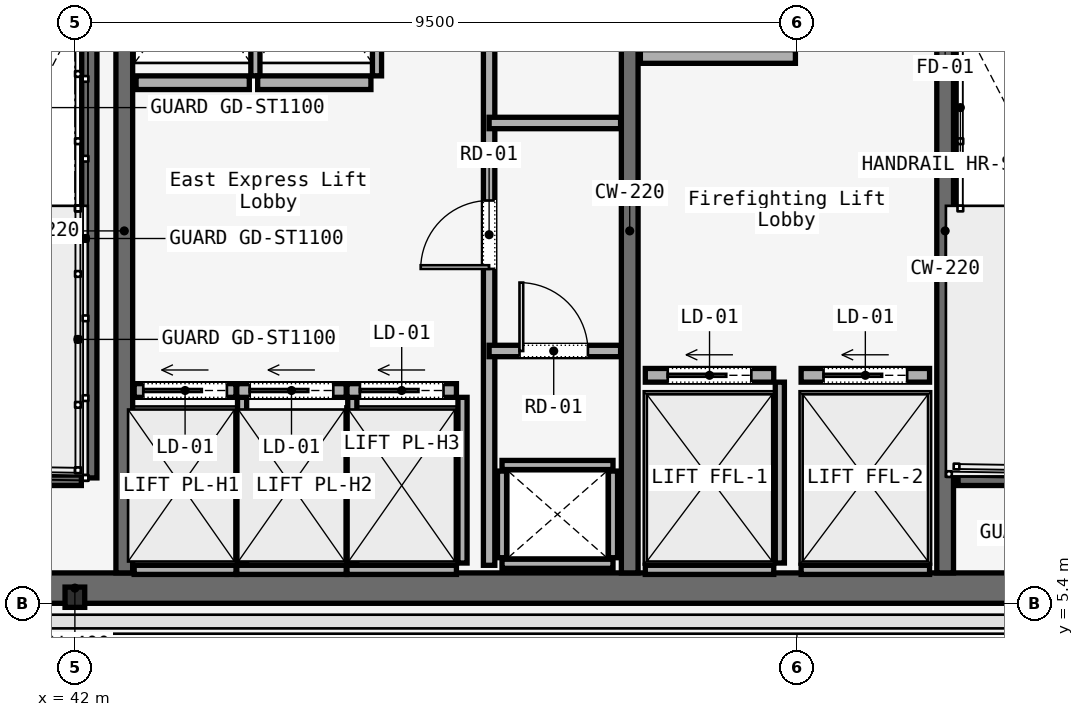
"""IFC4 building model, lengths in metres.
Left out: names, types, materials, properties, quantities, classifications, styles, units other than length and angle.
Written with IfcOpenShell. Run it as: python <this file> out.ifc"""

import sys

from ifc_helpers import new_model, si_unit, direction, frame, frame_2d, origin, origin_2d, place, context, subcontext, project, spatial, rectangle, i_section, extrude, element, fill, save


model = new_model("IFC4")
c1 = context("Model", 3, precision=1e-05, world=origin(), true_north=direction((0.0, 1.0)))
c2 = subcontext(c1, "Body", "Model", "MODEL_VIEW")
j1 = project(units=[si_unit("LENGTHUNIT", "METRE"), si_unit("PLANEANGLEUNIT", "RADIAN")], contexts=[c1])
p1 = place(None, origin())
s1 = spatial("IfcSite", under=j1, at=p1, CompositionType="ELEMENT")
p2 = place(p1, origin())
s2 = spatial("IfcBuilding", under=s1, at=p2, CompositionType="ELEMENT")
p3 = place(p2, frame((0.0, 0.0, 290.9)))
s3 = spatial("IfcBuildingStorey", under=s2, at=p3, CompositionType="ELEMENT", Elevation=290.9)
p4 = place(p3, frame((26.45, 5.6, 0.0), z_axis=(0.0, 0.0, 1.0), x_axis=(1.0, 0.0, 0.0)))
e1 = element("IfcWall", 1, at=p4, inside=s3, PredefinedType="SOLIDWALL", context=c2, shape_type="SweptSolid", body=[
    extrude(rectangle(XDim=31.1, YDim=0.4, at=frame_2d((15.55, 0.0))), origin(), (0.0, 0.0, 1.0), 3.58),
])
for number, where, z_axis, x_axis in (
    (2, (42.65, 5.8, 0.0), (0.0, 0.0, 1.0), (0.0, 1.0, 0.0)),
    (3, (49.3, 5.8, 0.0), (0.0, 0.0, 1.0), (0.0, 1.0, 0.0)),
):
    element("IfcWall", number, at=place(p3, frame(where, z_axis=z_axis, x_axis=x_axis)), inside=s3, PredefinedType="SOLIDWALL", context=c2, shape_type="SweptSolid", body=[
        extrude(rectangle(XDim=9.0, YDim=0.22, at=frame_2d((4.5, 0.0))), origin(), (0.0, 0.0, 1.0), 3.58),
    ])
p5 = place(p3, frame((53.45, 5.8, 0.0), z_axis=(0.0, 0.0, 1.0), x_axis=(0.0, 1.0, 0.0)))
e4 = element("IfcWall", 4, at=p5, inside=s3, PredefinedType="SOLIDWALL", context=c2, shape_type="SweptSolid", body=[
    extrude(rectangle(XDim=9.0, YDim=0.22, at=frame_2d((4.5, 0.0))), origin(), (0.0, 0.0, 1.0), 3.58),
])
p6 = place(p5, frame((7.5, 0.0, 0.0)))
e5 = element("IfcOpeningElement", 5, at=p6, cuts=e4, PredefinedType="OPENING", context=c2, shape_type="SweptSolid", body=[
    extrude(rectangle(XDim=1.1, YDim=2.2, at=frame_2d((0.55, 1.1))), frame((0.0, 0.11, 0.0), z_axis=(0.0, -1.0, 0.0), x_axis=(1.0, 0.0, 0.0)), (0.0, 0.0, 1.0), 0.22),
])
p7 = place(p3, frame((42.0, 5.48, 0.0), z_axis=(0.0, 0.0, 1.0), x_axis=(1.0, 0.0, 0.0)))
e6 = element("IfcColumn", 6, at=p7, inside=s3, PredefinedType="COLUMN", context=c2, shape_type="SweptSolid", body=[
    extrude(i_section(OverallWidth=0.259, OverallDepth=0.267, WebThickness=0.013, FlangeThickness=0.021, FilletRadius=0.013, at=origin_2d()), origin(), (0.0, 0.0, 1.0), 3.58),
])
p8 = place(p3, frame((42.19, 14.7, 0.0), z_axis=(0.0, 0.0, 1.0), x_axis=(0.0, -1.0, 0.0)))
e7 = element("IfcWall", 7, at=p8, inside=s3, PredefinedType="SOLIDWALL", context=c2, shape_type="SweptSolid", body=[
    extrude(rectangle(XDim=7.65, YDim=0.2, at=frame_2d((3.825, 0.0))), origin(), (0.0, 0.0, 1.0), 3.8),
])
for number, where, z_axis, x_axis in (
    (8, (38.97, 7.05, 0.0), (0.0, 0.0, 1.0), (1.0, 0.0, 0.0)),
    (9, (53.62, 7.05, 0.0), (0.0, 0.0, 1.0), (1.0, 0.0, 0.0)),
):
    element("IfcWall", number, at=place(p3, frame(where, z_axis=z_axis, x_axis=x_axis)), inside=s3, PredefinedType="SOLIDWALL", context=c2, shape_type="SweptSolid", body=[
        extrude(rectangle(XDim=3.115, YDim=0.2, at=frame_2d((1.558, 0.0))), origin(), (0.0, 0.0, 1.0), 3.8),
    ])
for number, where, z_axis, x_axis in (
    (10, (47.62, 5.92, 0.0), (0.0, 0.0, 1.0), (1.0, 0.0, 0.0)),
    (11, (47.62, 7.22, 0.0), (0.0, 0.0, 1.0), (1.0, 0.0, 0.0)),
):
    element("IfcWall", number, at=place(p3, frame(where, z_axis=z_axis, x_axis=x_axis)), inside=s3, PredefinedType="SOLIDWALL", context=c2, shape_type="SweptSolid", body=[
        extrude(rectangle(XDim=1.46, YDim=0.12, at=frame_2d((0.73, 0.0))), origin(), (0.0, 0.0, 1.0), 3.01),
    ])
for number, where, z_axis, x_axis in (
    (12, (47.62, 6.0, 0.0), (0.0, 0.0, 1.0), (0.0, 1.0, 0.0)),
    (13, (49.08, 6.0, 0.0), (0.0, 0.0, 1.0), (0.0, 1.0, 0.0)),
):
    element("IfcWall", number, at=place(p3, frame(where, z_axis=z_axis, x_axis=x_axis)), inside=s3, PredefinedType="SOLIDWALL", context=c2, shape_type="SweptSolid", body=[
        extrude(rectangle(XDim=1.14, YDim=0.12, at=frame_2d((0.57, 0.0))), origin(), (0.0, 0.0, 1.0), 3.01),
    ])
p9 = place(p3, frame((47.45, 5.9, 0.0), z_axis=(0.0, 0.0, 1.0), x_axis=(0.0, 1.0, 0.0)))
e14 = element("IfcWall", 14, at=p9, inside=s3, PredefinedType="PARTITIONING", context=c2, shape_type="SweptSolid", body=[
    extrude(rectangle(XDim=8.85, YDim=0.15, at=frame_2d((4.425, 0.0))), origin(), (0.0, 0.0, 1.0), 3.01),
])
p10 = place(p9, frame((3.9, 0.0, 0.0)))
e15 = element("IfcOpeningElement", 15, at=p10, cuts=e14, PredefinedType="OPENING", context=c2, shape_type="SweptSolid", body=[
    extrude(rectangle(XDim=0.9, YDim=2.1, at=frame_2d((0.45, 1.05))), frame((0.0, 0.075, 0.0), z_axis=(0.0, -1.0, 0.0), x_axis=(1.0, 0.0, 0.0)), (0.0, 0.0, 1.0), 0.15),
])
p11 = place(p3, frame((47.45, 8.72, 0.0), z_axis=(0.0, 0.0, 1.0), x_axis=(1.0, 0.0, 0.0)))
e16 = element("IfcWall", 16, at=p11, inside=s3, PredefinedType="PARTITIONING", context=c2, shape_type="SweptSolid", body=[
    extrude(rectangle(XDim=1.73, YDim=0.15, at=frame_2d((0.865, 0.0))), origin(), (0.0, 0.0, 1.0), 3.01),
])
p12 = place(p11, frame((0.4, 0.0, 0.0)))
e17 = element("IfcOpeningElement", 17, at=p12, cuts=e16, PredefinedType="OPENING", context=c2, shape_type="SweptSolid", body=[
    extrude(rectangle(XDim=0.9, YDim=2.1, at=frame_2d((0.45, 1.05))), frame((0.0, 0.075, 0.0), z_axis=(0.0, -1.0, 0.0), x_axis=(1.0, 0.0, 0.0)), (0.0, 0.0, 1.0), 0.15),
])
p13 = place(p3, frame((47.45, 11.72, 0.0), z_axis=(0.0, 0.0, 1.0), x_axis=(1.0, 0.0, 0.0)))
e18 = element("IfcWall", 18, at=p13, inside=s3, PredefinedType="PARTITIONING", context=c2, shape_type="SweptSolid", body=[
    extrude(rectangle(XDim=1.73, YDim=0.15, at=frame_2d((0.865, 0.0))), origin(), (0.0, 0.0, 1.0), 3.01),
])
p14 = place(p3, frame((42.78, 8.2, 0.0), z_axis=(0.0, 0.0, 1.0), x_axis=(1.0, 0.0, 0.0)))
e19 = element("IfcWall", 19, at=p14, inside=s3, PredefinedType="SOLIDWALL", context=c2, shape_type="SweptSolid", body=[
    extrude(rectangle(XDim=1.34, YDim=0.18, at=frame_2d((0.67, 0.0))), origin(), (0.0, 0.0, 1.0), 3.01),
])
p15 = place(p14, frame((0.12, 0.0, 0.0)))
e20 = element("IfcOpeningElement", 20, at=p15, cuts=e19, PredefinedType="OPENING", context=c2, shape_type="SweptSolid", body=[
    extrude(rectangle(XDim=1.1, YDim=2.2, at=frame_2d((0.55, 1.1))), frame((0.0, 0.09, 0.0), z_axis=(0.0, -1.0, 0.0), x_axis=(1.0, 0.0, 0.0)), (0.0, 0.0, 1.0), 0.18),
])
p16 = place(p3, frame((42.78, 5.84, 0.0), z_axis=(0.0, 0.0, 1.0), x_axis=(1.0, 0.0, 0.0)))
e21 = element("IfcWall", 21, at=p16, inside=s3, PredefinedType="SOLIDWALL", context=c2, shape_type="SweptSolid", body=[
    extrude(rectangle(XDim=1.34, YDim=0.12, at=frame_2d((0.67, 0.0))), origin(), (0.0, 0.0, 1.0), 3.01),
])
p17 = place(p3, frame((44.2, 5.93, 0.0), z_axis=(0.0, 0.0, 1.0), x_axis=(0.0, 1.0, 0.0)))
e22 = element("IfcWall", 22, at=p17, inside=s3, PredefinedType="SOLIDWALL", context=c2, shape_type="SweptSolid", body=[
    extrude(rectangle(XDim=2.18, YDim=0.12, at=frame_2d((1.09, 0.0))), origin(), (0.0, 0.0, 1.0), 3.01),
])
p18 = place(p3, frame((44.13, 8.2, 0.0), z_axis=(0.0, 0.0, 1.0), x_axis=(1.0, 0.0, 0.0)))
e23 = element("IfcWall", 23, at=p18, inside=s3, PredefinedType="SOLIDWALL", context=c2, shape_type="SweptSolid", body=[
    extrude(rectangle(XDim=1.44, YDim=0.18, at=frame_2d((0.72, 0.0))), origin(), (0.0, 0.0, 1.0), 3.01),
])
p19 = place(p18, frame((0.17, 0.0, 0.0)))
e24 = element("IfcOpeningElement", 24, at=p19, cuts=e23, PredefinedType="OPENING", context=c2, shape_type="SweptSolid", body=[
    extrude(rectangle(XDim=1.1, YDim=2.2, at=frame_2d((0.55, 1.1))), frame((0.0, 0.09, 0.0), z_axis=(0.0, -1.0, 0.0), x_axis=(1.0, 0.0, 0.0)), (0.0, 0.0, 1.0), 0.18),
])
p20 = place(p3, frame((44.13, 5.84, 0.0), z_axis=(0.0, 0.0, 1.0), x_axis=(1.0, 0.0, 0.0)))
e25 = element("IfcWall", 25, at=p20, inside=s3, PredefinedType="SOLIDWALL", context=c2, shape_type="SweptSolid", body=[
    extrude(rectangle(XDim=1.44, YDim=0.12, at=frame_2d((0.72, 0.0))), origin(), (0.0, 0.0, 1.0), 3.01),
])
p21 = place(p3, frame((45.65, 5.93, 0.0), z_axis=(0.0, 0.0, 1.0), x_axis=(0.0, 1.0, 0.0)))
e26 = element("IfcWall", 26, at=p21, inside=s3, PredefinedType="SOLIDWALL", context=c2, shape_type="SweptSolid", body=[
    extrude(rectangle(XDim=2.18, YDim=0.12, at=frame_2d((1.09, 0.0))), origin(), (0.0, 0.0, 1.0), 3.01),
])
p22 = place(p3, frame((45.58, 8.2, 0.0), z_axis=(0.0, 0.0, 1.0), x_axis=(1.0, 0.0, 0.0)))
e27 = element("IfcWall", 27, at=p22, inside=s3, PredefinedType="SOLIDWALL", context=c2, shape_type="SweptSolid", body=[
    extrude(rectangle(XDim=1.44, YDim=0.18, at=frame_2d((0.72, 0.0))), origin(), (0.0, 0.0, 1.0), 3.01),
])
p23 = place(p22, frame((0.17, 0.0, 0.0)))
e28 = element("IfcOpeningElement", 28, at=p23, cuts=e27, PredefinedType="OPENING", context=c2, shape_type="SweptSolid", body=[
    extrude(rectangle(XDim=1.1, YDim=2.2, at=frame_2d((0.55, 1.1))), frame((0.0, 0.09, 0.0), z_axis=(0.0, -1.0, 0.0), x_axis=(1.0, 0.0, 0.0)), (0.0, 0.0, 1.0), 0.18),
])
p24 = place(p3, frame((45.58, 5.84, 0.0), z_axis=(0.0, 0.0, 1.0), x_axis=(1.0, 0.0, 0.0)))
e29 = element("IfcWall", 29, at=p24, inside=s3, PredefinedType="SOLIDWALL", context=c2, shape_type="SweptSolid", body=[
    extrude(rectangle(XDim=1.44, YDim=0.12, at=frame_2d((0.72, 0.0))), origin(), (0.0, 0.0, 1.0), 3.01),
])
p25 = place(p3, frame((47.1, 5.93, 0.0), z_axis=(0.0, 0.0, 1.0), x_axis=(0.0, 1.0, 0.0)))
e30 = element("IfcWall", 30, at=p25, inside=s3, PredefinedType="SOLIDWALL", context=c2, shape_type="SweptSolid", body=[
    extrude(rectangle(XDim=2.18, YDim=0.12, at=frame_2d((1.09, 0.0))), origin(), (0.0, 0.0, 1.0), 3.01),
])
p26 = place(p3, frame((42.805, 12.25, 0.0), z_axis=(0.0, 0.0, 1.0), x_axis=(1.0, 0.0, 0.0)))
e31 = element("IfcWall", 31, at=p26, inside=s3, PredefinedType="SOLIDWALL", context=c2, shape_type="SweptSolid", body=[
    extrude(rectangle(XDim=1.49, YDim=0.18, at=frame_2d((0.745, 0.0))), origin(), (0.0, 0.0, 1.0), 3.01),
])
p27 = place(p3, frame((44.375, 12.34, 0.0), z_axis=(0.0, 0.0, 1.0), x_axis=(0.0, 1.0, 0.0)))
e32 = element("IfcWall", 32, at=p27, inside=s3, PredefinedType="SOLIDWALL", context=c2, shape_type="SweptSolid", body=[
    extrude(rectangle(XDim=2.23, YDim=0.12, at=frame_2d((1.115, 0.0))), origin(), (0.0, 0.0, 1.0), 3.01),
])
p28 = place(p3, frame((44.405, 12.25, 0.0), z_axis=(0.0, 0.0, 1.0), x_axis=(1.0, 0.0, 0.0)))
e33 = element("IfcWall", 33, at=p28, inside=s3, PredefinedType="SOLIDWALL", context=c2, shape_type="SweptSolid", body=[
    extrude(rectangle(XDim=1.49, YDim=0.18, at=frame_2d((0.745, 0.0))), origin(), (0.0, 0.0, 1.0), 3.01),
])
p29 = place(p3, frame((45.975, 12.34, 0.0), z_axis=(0.0, 0.0, 1.0), x_axis=(0.0, 1.0, 0.0)))
e34 = element("IfcWall", 34, at=p29, inside=s3, PredefinedType="SOLIDWALL", context=c2, shape_type="SweptSolid", body=[
    extrude(rectangle(XDim=2.23, YDim=0.12, at=frame_2d((1.115, 0.0))), origin(), (0.0, 0.0, 1.0), 3.01),
])
p30 = place(p3, frame((49.505, 8.4, 0.0), z_axis=(0.0, 0.0, 1.0), x_axis=(1.0, 0.0, 0.0)))
e35 = element("IfcWall", 35, at=p30, inside=s3, PredefinedType="SOLIDWALL", context=c2, shape_type="SweptSolid", body=[
    extrude(rectangle(XDim=1.69, YDim=0.18, at=frame_2d((0.845, 0.0))), origin(), (0.0, 0.0, 1.0), 3.01),
])
p31 = place(p30, frame((0.295, 0.0, 0.0)))
e36 = element("IfcOpeningElement", 36, at=p31, cuts=e35, PredefinedType="OPENING", context=c2, shape_type="SweptSolid", body=[
    extrude(rectangle(XDim=1.1, YDim=2.2, at=frame_2d((0.55, 1.1))), frame((0.0, 0.09, 0.0), z_axis=(0.0, -1.0, 0.0), x_axis=(1.0, 0.0, 0.0)), (0.0, 0.0, 1.0), 0.18),
])
p32 = place(p3, frame((49.505, 5.84, 0.0), z_axis=(0.0, 0.0, 1.0), x_axis=(1.0, 0.0, 0.0)))
e37 = element("IfcWall", 37, at=p32, inside=s3, PredefinedType="SOLIDWALL", context=c2, shape_type="SweptSolid", body=[
    extrude(rectangle(XDim=1.69, YDim=0.12, at=frame_2d((0.845, 0.0))), origin(), (0.0, 0.0, 1.0), 3.01),
])
p33 = place(p3, frame((51.275, 5.93, 0.0), z_axis=(0.0, 0.0, 1.0), x_axis=(0.0, 1.0, 0.0)))
e38 = element("IfcWall", 38, at=p33, inside=s3, PredefinedType="SOLIDWALL", context=c2, shape_type="SweptSolid", body=[
    extrude(rectangle(XDim=2.38, YDim=0.12, at=frame_2d((1.19, 0.0))), origin(), (0.0, 0.0, 1.0), 3.01),
])
p34 = place(p3, frame((51.555, 8.4, 0.0), z_axis=(0.0, 0.0, 1.0), x_axis=(1.0, 0.0, 0.0)))
e39 = element("IfcWall", 39, at=p34, inside=s3, PredefinedType="SOLIDWALL", context=c2, shape_type="SweptSolid", body=[
    extrude(rectangle(XDim=1.69, YDim=0.18, at=frame_2d((0.845, 0.0))), origin(), (0.0, 0.0, 1.0), 3.01),
])
p35 = place(p34, frame((0.295, 0.0, 0.0)))
e40 = element("IfcOpeningElement", 40, at=p35, cuts=e39, PredefinedType="OPENING", context=c2, shape_type="SweptSolid", body=[
    extrude(rectangle(XDim=1.1, YDim=2.2, at=frame_2d((0.55, 1.1))), frame((0.0, 0.09, 0.0), z_axis=(0.0, -1.0, 0.0), x_axis=(1.0, 0.0, 0.0)), (0.0, 0.0, 1.0), 0.18),
])
p36 = place(p3, frame((51.555, 5.84, 0.0), z_axis=(0.0, 0.0, 1.0), x_axis=(1.0, 0.0, 0.0)))
e41 = element("IfcWall", 41, at=p36, inside=s3, PredefinedType="SOLIDWALL", context=c2, shape_type="SweptSolid", body=[
    extrude(rectangle(XDim=1.69, YDim=0.12, at=frame_2d((0.845, 0.0))), origin(), (0.0, 0.0, 1.0), 3.01),
])
p37 = place(p3, frame((49.44, 12.595, 0.0), z_axis=(0.0, 0.0, 1.0), x_axis=(1.0, 0.0, 0.0)))
e42 = element("IfcWall", 42, at=p37, inside=s3, PredefinedType="SOLIDWALL", context=c2, shape_type="SweptSolid", body=[
    extrude(rectangle(XDim=2.04, YDim=0.18, at=frame_2d((1.02, 0.0))), origin(), (0.0, 0.0, 1.0), 3.01),
])
p38 = place(p10, origin())
e43 = element("IfcDoor", 43, at=p38, inside=s3, OperationType="SINGLE_SWING_LEFT", PredefinedType="DOOR", context=c2, shape_type="SweptSolid", body=[
    extrude(rectangle(XDim=0.9, YDim=2.1, at=frame_2d((0.45, 1.05))), frame((0.0, 0.025, 0.0), z_axis=(0.0, -1.0, 0.0), x_axis=(1.0, 0.0, 0.0)), (0.0, 0.0, 1.0), 0.05),
])
fill(e15, e43)
p39 = place(p12, origin())
e44 = element("IfcDoor", 44, at=p39, inside=s3, OperationType="SINGLE_SWING_RIGHT", PredefinedType="DOOR", context=c2, shape_type="SweptSolid", body=[
    extrude(rectangle(XDim=0.9, YDim=2.1, at=frame_2d((0.45, 1.05))), frame((0.0, 0.025, 0.0), z_axis=(0.0, -1.0, 0.0), x_axis=(1.0, 0.0, 0.0)), (0.0, 0.0, 1.0), 0.05),
])
fill(e17, e44)
p40 = place(p15, origin())
e45 = element("IfcDoor", 45, at=p40, inside=s3, OperationType="SLIDING_TO_LEFT", PredefinedType="DOOR", context=c2, shape_type="SweptSolid", body=[
    extrude(rectangle(XDim=1.1, YDim=2.2, at=frame_2d((0.55, 1.1))), frame((0.0, 0.025, 0.0), z_axis=(0.0, -1.0, 0.0), x_axis=(1.0, 0.0, 0.0)), (0.0, 0.0, 1.0), 0.05),
])
fill(e20, e45)
p41 = place(p19, origin())
e46 = element("IfcDoor", 46, at=p41, inside=s3, OperationType="SLIDING_TO_LEFT", PredefinedType="DOOR", context=c2, shape_type="SweptSolid", body=[
    extrude(rectangle(XDim=1.1, YDim=2.2, at=frame_2d((0.55, 1.1))), frame((0.0, 0.025, 0.0), z_axis=(0.0, -1.0, 0.0), x_axis=(1.0, 0.0, 0.0)), (0.0, 0.0, 1.0), 0.05),
])
fill(e24, e46)
p42 = place(p23, origin())
e47 = element("IfcDoor", 47, at=p42, inside=s3, OperationType="SLIDING_TO_LEFT", PredefinedType="DOOR", context=c2, shape_type="SweptSolid", body=[
    extrude(rectangle(XDim=1.1, YDim=2.2, at=frame_2d((0.55, 1.1))), frame((0.0, 0.025, 0.0), z_axis=(0.0, -1.0, 0.0), x_axis=(1.0, 0.0, 0.0)), (0.0, 0.0, 1.0), 0.05),
])
fill(e28, e47)
p43 = place(p31, origin())
e48 = element("IfcDoor", 48, at=p43, inside=s3, OperationType="SLIDING_TO_LEFT", PredefinedType="DOOR", context=c2, shape_type="SweptSolid", body=[
    extrude(rectangle(XDim=1.1, YDim=2.2, at=frame_2d((0.55, 1.1))), frame((0.0, 0.025, 0.0), z_axis=(0.0, -1.0, 0.0), x_axis=(1.0, 0.0, 0.0)), (0.0, 0.0, 1.0), 0.05),
])
fill(e36, e48)
p44 = place(p35, origin())
e49 = element("IfcDoor", 49, at=p44, inside=s3, OperationType="SLIDING_TO_LEFT", PredefinedType="DOOR", context=c2, shape_type="SweptSolid", body=[
    extrude(rectangle(XDim=1.1, YDim=2.2, at=frame_2d((0.55, 1.1))), frame((0.0, 0.025, 0.0), z_axis=(0.0, -1.0, 0.0), x_axis=(1.0, 0.0, 0.0)), (0.0, 0.0, 1.0), 0.05),
])
fill(e40, e49)
save(model, sys.argv[1])
